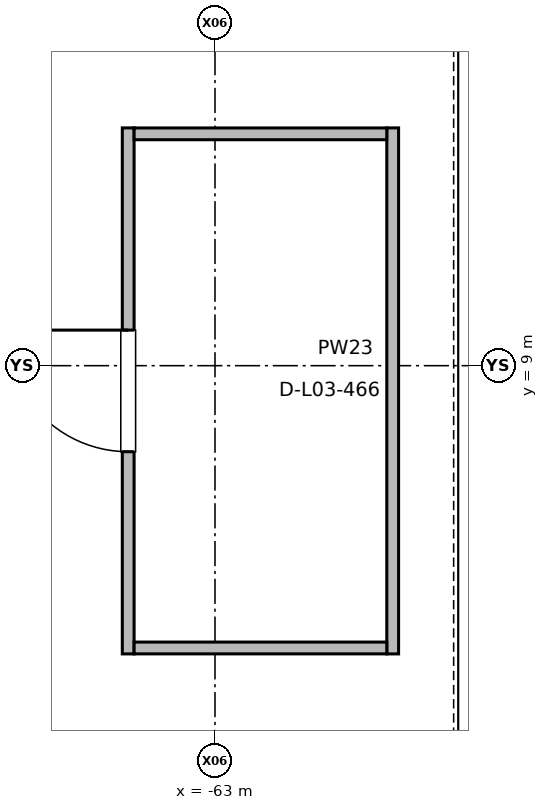
"""IFC4 building model, lengths in metres.
Left out: names, types, materials, properties, quantities, classifications, styles, units other than length and angle.
Written with IfcOpenShell. Run it as: python <this file> out.ifc"""

import sys

from ifc_helpers import new_model, si_unit, direction, frame, frame_2d, origin, place, context, subcontext, project, spatial, rectangle, extrude, element, fill, save


model = new_model("IFC4")
c1 = context("Model", 3, precision=1e-05, world=origin(), true_north=direction((0.0, 1.0)))
c2 = subcontext(c1, "Body", "Model", "MODEL_VIEW")
j1 = project(units=[si_unit("LENGTHUNIT", "METRE"), si_unit("PLANEANGLEUNIT", "RADIAN")], contexts=[c1])
p1 = place(None, origin())
s1 = spatial("IfcSite", under=j1, at=p1, CompositionType="ELEMENT")
p2 = place(p1, origin())
s2 = spatial("IfcBuilding", under=s1, at=p2, CompositionType="ELEMENT")
p3 = place(p2, frame((0.0, 0.0, 11.4)))
s3 = spatial("IfcBuildingStorey", under=s2, at=p3, CompositionType="ELEMENT", Elevation=11.4)
p4 = place(p3, frame((-64.142, 5.208, 0.0), z_axis=(0.0, 0.0, 1.0), x_axis=(0.0, 1.0, 0.0)))
e1 = element("IfcWall", 1, at=p4, inside=s3, PredefinedType="PARTITIONING", context=c2, shape_type="SweptSolid", body=[
    extrude(rectangle(XDim=6.92, YDim=0.155, at=frame_2d((3.46, 0.0))), origin(), (0.0, 0.0, 1.0), 3.82),
])
p5 = place(p4, frame((2.66, 0.0, 0.0)))
e2 = element("IfcOpeningElement", 2, at=p5, cuts=e1, PredefinedType="OPENING", context=c2, shape_type="SweptSolid", body=[
    extrude(rectangle(XDim=1.6, YDim=2.25, at=frame_2d((0.8, 1.125))), frame((0.0, 0.087, 0.0), z_axis=(0.0, -1.0, 0.0), x_axis=(1.0, 0.0, 0.0)), (0.0, 0.0, 1.0), 0.175),
])
p6 = place(p3, frame((-60.662, 5.208, 0.0), z_axis=(0.0, 0.0, 1.0), x_axis=(0.0, 1.0, 0.0)))
e3 = element("IfcWall", 3, at=p6, inside=s3, PredefinedType="PARTITIONING", context=c2, shape_type="SweptSolid", body=[
    extrude(rectangle(XDim=6.92, YDim=0.155, at=frame_2d((3.46, 0.0))), origin(), (0.0, 0.0, 1.0), 3.82),
])
for number, where, z_axis, x_axis in (
    (4, (-64.064, 5.286, 0.0), (0.0, 0.0, 1.0), (1.0, 0.0, 0.0)),
    (5, (-64.064, 12.05, 0.0), (0.0, 0.0, 1.0), (1.0, 0.0, 0.0)),
):
    element("IfcWall", number, at=place(p3, frame(where, z_axis=z_axis, x_axis=x_axis)), inside=s3, PredefinedType="PARTITIONING", context=c2, shape_type="SweptSolid", body=[
        extrude(rectangle(XDim=3.324, YDim=0.155, at=frame_2d((1.662, 0.0))), origin(), (0.0, 0.0, 1.0), 3.82),
    ])
p7 = place(p5, origin())
e6 = element("IfcDoor", 6, at=p7, inside=s3, OperationType="SINGLE_SWING_RIGHT", PredefinedType="DOOR", context=c2, shape_type="SweptSolid", body=[
    extrude(rectangle(XDim=1.6, YDim=2.25, at=frame_2d((0.8, 1.125))), frame((0.0, 0.025, 0.0), z_axis=(0.0, -1.0, 0.0), x_axis=(1.0, 0.0, 0.0)), (0.0, 0.0, 1.0), 0.05),
])
fill(e2, e6)
save(model, sys.argv[1])
